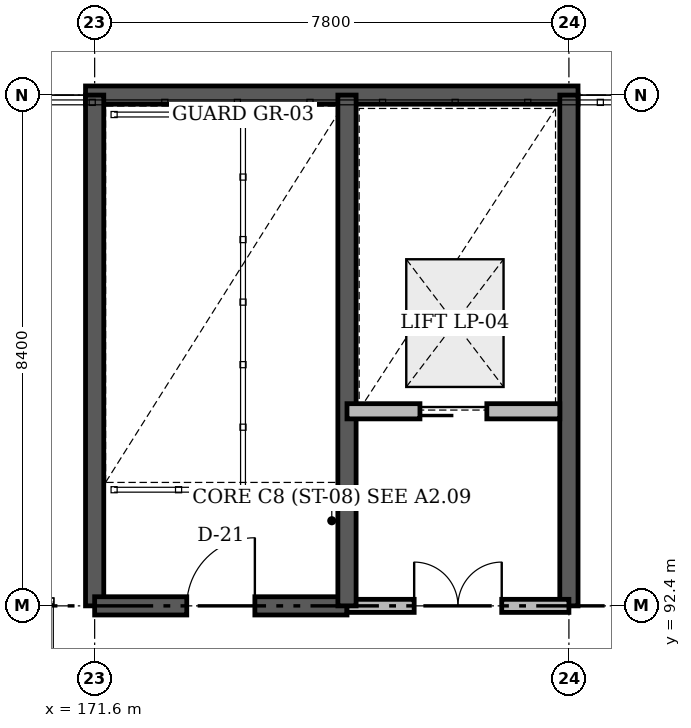
"""IFC4 building model, lengths in metres.
Left out: names, types, materials, properties, quantities, classifications, styles, units other than length and angle.
Written with IfcOpenShell. Run it as: python <this file> out.ifc"""

import sys

from ifc_helpers import new_model, si_unit, direction, frame, frame_2d, origin, place, context, subcontext, project, spatial, rectangle, extrude, element, fill, save


model = new_model("IFC4")
c1 = context("Model", 3, precision=1e-05, world=origin(), true_north=direction((0.0, 1.0)))
c2 = subcontext(c1, "Body", "Model", "MODEL_VIEW")
j1 = project(units=[si_unit("LENGTHUNIT", "METRE"), si_unit("PLANEANGLEUNIT", "RADIAN")], contexts=[c1])
p1 = place(None, origin())
s1 = spatial("IfcSite", under=j1, at=p1, CompositionType="ELEMENT")
p2 = place(p1, origin())
s2 = spatial("IfcBuilding", under=s1, at=p2, CompositionType="ELEMENT")
p3 = place(p2, frame((0.0, 0.0, 18.0)))
s3 = spatial("IfcBuildingStorey", under=s2, at=p3, CompositionType="ELEMENT", Elevation=18.0)
p4 = place(p3, frame((171.45, 100.8, 0.0), z_axis=(0.0, 0.0, 1.0), x_axis=(1.0, 0.0, 0.0)))
e1 = element("IfcWall", 1, at=p4, inside=s3, PredefinedType="SHEAR", context=c2, shape_type="SweptSolid", body=[
    extrude(rectangle(XDim=8.1, YDim=0.3, at=frame_2d((4.05, 0.0))), origin(), (0.0, 0.0, 1.0), 4.2),
])
for number, where, z_axis, x_axis in (
    (2, (171.6, 92.4, 0.0), (0.0, 0.0, 1.0), (0.0, 1.0, 0.0)),
    (3, (179.4, 92.4, 0.0), (0.0, 0.0, 1.0), (0.0, 1.0, 0.0)),
):
    element("IfcWall", number, at=place(p3, frame(where, z_axis=z_axis, x_axis=x_axis)), inside=s3, PredefinedType="SHEAR", context=c2, shape_type="SweptSolid", body=[
        extrude(rectangle(XDim=8.4, YDim=0.3, at=frame_2d((4.2, 0.0))), origin(), (0.0, 0.0, 1.0), 4.2),
    ])
p5 = place(p3, frame((171.6, 92.4, 0.0), z_axis=(0.0, 0.0, 1.0), x_axis=(1.0, 0.0, 0.0)))
e4 = element("IfcWall", 4, at=p5, inside=s3, PredefinedType="SHEAR", context=c2, shape_type="SweptSolid", body=[
    extrude(rectangle(XDim=4.15, YDim=0.3, at=frame_2d((2.075, 0.0))), origin(), (0.0, 0.0, 1.0), 4.2),
])
p6 = place(p5, frame((1.515, 0.0, 0.0)))
e5 = element("IfcOpeningElement", 5, at=p6, cuts=e4, PredefinedType="OPENING", context=c2, shape_type="SweptSolid", body=[
    extrude(rectangle(XDim=1.12, YDim=2.15, at=frame_2d((0.56, 1.075))), frame((0.0, 0.16, 0.0), z_axis=(0.0, -1.0, 0.0), x_axis=(1.0, 0.0, 0.0)), (0.0, 0.0, 1.0), 0.32),
])
p7 = place(p3, frame((175.75, 92.4, 0.0), z_axis=(0.0, 0.0, 1.0), x_axis=(1.0, 0.0, 0.0)))
e6 = element("IfcWall", 6, at=p7, inside=s3, PredefinedType="STANDARD", context=c2, shape_type="SweptSolid", body=[
    extrude(rectangle(XDim=3.65, YDim=0.215, at=frame_2d((1.825, 0.0))), origin(), (0.0, 0.0, 1.0), 3.22),
])
p8 = place(p7, frame((1.105, 0.0, 0.0)))
e7 = element("IfcOpeningElement", 7, at=p8, cuts=e6, PredefinedType="OPENING", context=c2, shape_type="SweptSolid", body=[
    extrude(rectangle(XDim=1.44, YDim=2.2, at=frame_2d((0.72, 1.1))), frame((0.0, 0.118, 0.0), z_axis=(0.0, -1.0, 0.0), x_axis=(1.0, 0.0, 0.0)), (0.0, 0.0, 1.0), 0.235),
])
p9 = place(p3, frame((175.75, 92.4, 0.0), z_axis=(0.0, 0.0, 1.0), x_axis=(0.0, 1.0, 0.0)))
e8 = element("IfcWall", 8, at=p9, inside=s3, PredefinedType="SHEAR", context=c2, shape_type="SweptSolid", body=[
    extrude(rectangle(XDim=8.4, YDim=0.3, at=frame_2d((4.2, 0.0))), origin(), (0.0, 0.0, 1.0), 4.2),
])
p10 = place(p3, frame((175.75, 95.6, 0.0), z_axis=(0.0, 0.0, 1.0), x_axis=(1.0, 0.0, 0.0)))
e9 = element("IfcWall", 9, at=p10, inside=s3, PredefinedType="STANDARD", context=c2, shape_type="SweptSolid", body=[
    extrude(rectangle(XDim=3.5, YDim=0.25, at=frame_2d((1.75, 0.0))), origin(), (0.0, 0.0, 1.0), 3.9),
])
p11 = place(p10, frame((1.2, 0.0, 0.0)))
e10 = element("IfcOpeningElement", 10, at=p11, cuts=e9, PredefinedType="OPENING", context=c2, shape_type="SweptSolid", body=[
    extrude(rectangle(XDim=1.1, YDim=2.2, at=frame_2d((0.55, 1.1))), frame((0.0, 0.135, 0.0), z_axis=(0.0, -1.0, 0.0), x_axis=(1.0, 0.0, 0.0)), (0.0, 0.0, 1.0), 0.27),
])
p12 = place(p6, origin())
e11 = element("IfcDoor", 11, at=p12, inside=s3, OperationType="SINGLE_SWING_RIGHT", PredefinedType="DOOR", context=c2, shape_type="SweptSolid", body=[
    extrude(rectangle(XDim=1.12, YDim=2.15, at=frame_2d((0.56, 1.075))), frame((0.0, 0.025, 0.0), z_axis=(0.0, -1.0, 0.0), x_axis=(1.0, 0.0, 0.0)), (0.0, 0.0, 1.0), 0.05),
])
fill(e5, e11)
p13 = place(p8, origin())
e12 = element("IfcDoor", 12, at=p13, inside=s3, OperationType="DOUBLE_DOOR_SINGLE_SWING", PredefinedType="DOOR", context=c2, shape_type="SweptSolid", body=[
    extrude(rectangle(XDim=1.44, YDim=2.2, at=frame_2d((0.72, 1.1))), frame((0.0, 0.025, 0.0), z_axis=(0.0, -1.0, 0.0), x_axis=(1.0, 0.0, 0.0)), (0.0, 0.0, 1.0), 0.05),
])
fill(e7, e12)
p14 = place(p11, origin())
e13 = element("IfcDoor", 13, at=p14, inside=s3, OperationType="SLIDING_TO_LEFT", PredefinedType="DOOR", context=c2, shape_type="SweptSolid", body=[
    extrude(rectangle(XDim=1.1, YDim=2.2, at=frame_2d((0.55, 1.1))), frame((0.0, 0.025, 0.0), z_axis=(0.0, -1.0, 0.0), x_axis=(1.0, 0.0, 0.0)), (0.0, 0.0, 1.0), 0.05),
])
fill(e10, e13)
save(model, sys.argv[1])
